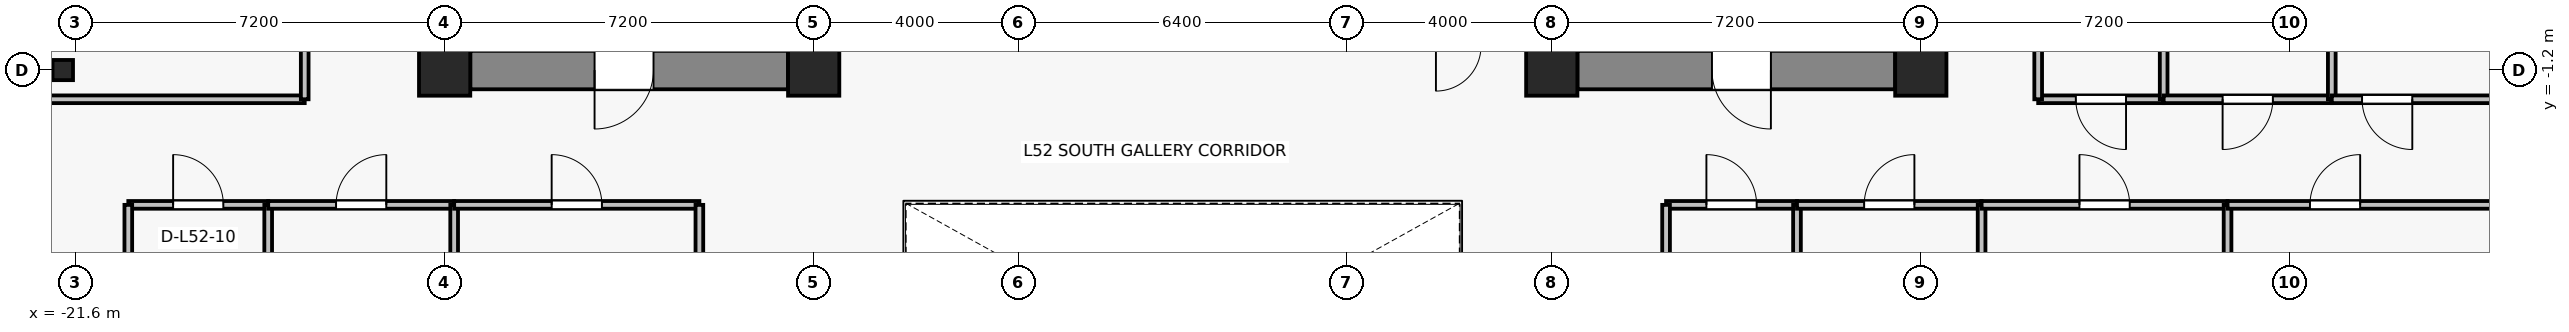
"""IFC4 building model, lengths in metres.
Left out: names, types, materials, properties, quantities, classifications, styles, units other than length and angle.
Written with IfcOpenShell. Run it as: python <this file> out.ifc"""

import sys

from ifc_helpers import new_model, si_unit, direction, frame, frame_2d, origin, origin_2d, place, context, subcontext, project, spatial, rectangle, i_section, extrude, source, transform, mapped, element, fill, save


model = new_model("IFC4")
c1 = context("Model", 3, precision=1e-05, world=origin(), true_north=direction((0.0, 1.0)))
c2 = subcontext(c1, "Body", "Model", "MODEL_VIEW")
j1 = project(units=[si_unit("LENGTHUNIT", "METRE"), si_unit("PLANEANGLEUNIT", "RADIAN")], contexts=[c1])
p1 = place(None, origin())
s1 = spatial("IfcSite", under=j1, at=p1, CompositionType="ELEMENT")
p2 = place(p1, origin())
s2 = spatial("IfcBuilding", under=s1, at=p2, CompositionType="ELEMENT")
p3 = place(p2, frame((0.0, 0.0, 185.8)))
s3 = spatial("IfcBuildingStorey", under=s2, at=p3, CompositionType="ELEMENT", Elevation=185.8)
for number, where, z_axis, x_axis in (
    (1, (-14.4, -1.2, 0.0), (0.0, 0.0, 1.0), (1.0, 0.0, 0.0)),
    (2, (-7.2, -1.2, 0.0), (0.0, 0.0, 1.0), (1.0, 0.0, 0.0)),
    (3, (7.2, -1.2, 0.0), (0.0, 0.0, 1.0), (1.0, 0.0, 0.0)),
    (4, (14.4, -1.2, 0.0), (0.0, 0.0, 1.0), (1.0, 0.0, 0.0)),
):
    element("IfcColumn", number, at=place(p3, frame(where, z_axis=z_axis, x_axis=x_axis)), inside=s3, PredefinedType="COLUMN", context=c2, shape_type="SweptSolid", body=[
        extrude(rectangle(XDim=1.0, YDim=1.0, at=origin_2d()), origin(), (0.0, 0.0, 1.0), 3.3),
    ])
p4 = place(p3, frame((-21.85, -1.2, 0.0), z_axis=(0.0, 0.0, 1.0), x_axis=(1.0, 0.0, 0.0)))
e5 = element("IfcColumn", 5, at=p4, inside=s3, PredefinedType="COLUMN", context=c2, shape_type="SweptSolid", body=[
    extrude(i_section(OverallWidth=0.399, OverallDepth=0.394, WebThickness=0.023, FlangeThickness=0.037, FilletRadius=0.015, at=origin_2d()), origin(), (0.0, 0.0, 1.0), 3.3),
])
p5 = place(p3, frame((-7.7, -1.2, 0.0), z_axis=(0.0, 0.0, 1.0), x_axis=(-1.0, 0.0, 0.0)))
e6 = element("IfcWall", 6, at=p5, inside=s3, PredefinedType="SHEAR", context=c2, shape_type="SweptSolid", body=[
    extrude(rectangle(XDim=6.2, YDim=0.75, at=frame_2d((3.1, 0.0))), origin(), (0.0, 0.0, 1.0), 3.075),
])
p6 = place(p5, frame((2.625, 0.0, 0.0)))
e7 = element("IfcOpeningElement", 7, at=p6, cuts=e6, PredefinedType="OPENING", context=c2, shape_type="SweptSolid", body=[
    extrude(rectangle(XDim=1.15, YDim=2.15, at=frame_2d((0.575, 1.075))), frame((0.0, 0.385, 0.0), z_axis=(0.0, -1.0, 0.0), x_axis=(1.0, 0.0, 0.0)), (0.0, 0.0, 1.0), 0.77),
])
p7 = place(p3, frame((13.9, -1.2, 0.0), z_axis=(0.0, 0.0, 1.0), x_axis=(-1.0, 0.0, 0.0)))
e8 = element("IfcWall", 8, at=p7, inside=s3, PredefinedType="SHEAR", context=c2, shape_type="SweptSolid", body=[
    extrude(rectangle(XDim=6.2, YDim=0.75, at=frame_2d((3.1, 0.0))), origin(), (0.0, 0.0, 1.0), 3.075),
])
p8 = place(p7, frame((2.425, 0.0, 0.0)))
e9 = element("IfcOpeningElement", 9, at=p8, cuts=e8, PredefinedType="OPENING", context=c2, shape_type="SweptSolid", body=[
    extrude(rectangle(XDim=1.15, YDim=2.15, at=frame_2d((0.575, 1.075))), frame((0.0, 0.385, 0.0), z_axis=(0.0, -1.0, 0.0), x_axis=(1.0, 0.0, 0.0)), (0.0, 0.0, 1.0), 0.77),
])
p9 = place(p3, frame((-20.572, -3.83, 0.0), z_axis=(0.0, 0.0, 1.0), x_axis=(1.0, 0.0, 0.0)))
e10 = element("IfcWall", 10, at=p9, inside=s3, PredefinedType="PARTITIONING", context=c2, shape_type="SweptSolid", body=[
    extrude(rectangle(XDim=2.729, YDim=0.15, at=frame_2d((1.365, 0.0))), origin(), (0.0, 0.0, 1.0), 3.075),
])
p10 = place(p9, frame((0.875, 0.0, 0.0)))
e11 = element("IfcOpeningElement", 11, at=p10, cuts=e10, PredefinedType="OPENING", context=c2, shape_type="SweptSolid", body=[
    extrude(rectangle(XDim=0.98, YDim=2.15, at=frame_2d((0.49, 1.075))), frame((0.0, 0.085, 0.0), z_axis=(0.0, -1.0, 0.0), x_axis=(1.0, 0.0, 0.0)), (0.0, 0.0, 1.0), 0.17),
])
for number, where, z_axis, x_axis in (
    (12, (-20.572, -7.12, 0.0), (0.0, 0.0, 1.0), (0.0, 1.0, 0.0)),
    (13, (-17.843, -3.83, 0.0), (0.0, 0.0, 1.0), (0.0, -1.0, 0.0)),
):
    element("IfcWall", number, at=place(p3, frame(where, z_axis=z_axis, x_axis=x_axis)), inside=s3, PredefinedType="PARTITIONING", context=c2, shape_type="SweptSolid", body=[
        extrude(rectangle(XDim=3.29, YDim=0.15, at=frame_2d((1.645, 0.0))), origin(), (0.0, 0.0, 1.0), 2.665),
    ])
p11 = place(p3, frame((-17.843, -3.83, 0.0), z_axis=(0.0, 0.0, 1.0), x_axis=(1.0, 0.0, 0.0)))
e14 = element("IfcWall", 14, at=p11, inside=s3, PredefinedType="PARTITIONING", context=c2, shape_type="SweptSolid", body=[
    extrude(rectangle(XDim=3.628, YDim=0.15, at=frame_2d((1.814, 0.0))), origin(), (0.0, 0.0, 1.0), 2.565),
])
p12 = place(p11, frame((1.324, 0.0, 0.0)))
e15 = element("IfcOpeningElement", 15, at=p12, cuts=e14, PredefinedType="OPENING", context=c2, shape_type="SweptSolid", body=[
    extrude(rectangle(XDim=0.98, YDim=2.15, at=frame_2d((0.49, 1.075))), frame((0.0, 0.085, 0.0), z_axis=(0.0, -1.0, 0.0), x_axis=(1.0, 0.0, 0.0)), (0.0, 0.0, 1.0), 0.17),
])
p13 = place(p3, frame((-14.214, -3.83, 0.0), z_axis=(0.0, 0.0, 1.0), x_axis=(0.0, -1.0, 0.0)))
e16 = element("IfcWall", 16, at=p13, inside=s3, PredefinedType="PARTITIONING", context=c2, shape_type="SweptSolid", body=[
    extrude(rectangle(XDim=3.29, YDim=0.15, at=frame_2d((1.645, 0.0))), origin(), (0.0, 0.0, 1.0), 2.565),
])
p14 = place(p3, frame((-14.214, -3.83, 0.0), z_axis=(0.0, 0.0, 1.0), x_axis=(1.0, 0.0, 0.0)))
e17 = element("IfcWall", 17, at=p14, inside=s3, PredefinedType="PARTITIONING", context=c2, shape_type="SweptSolid", body=[
    extrude(rectangle(XDim=4.784, YDim=0.15, at=frame_2d((2.392, 0.0))), origin(), (0.0, 0.0, 1.0), 2.565),
])
p15 = place(p14, frame((1.902, 0.0, 0.0)))
e18 = element("IfcOpeningElement", 18, at=p15, cuts=e17, PredefinedType="OPENING", context=c2, shape_type="SweptSolid", body=[
    extrude(rectangle(XDim=0.98, YDim=2.15, at=frame_2d((0.49, 1.075))), frame((0.0, 0.085, 0.0), z_axis=(0.0, -1.0, 0.0), x_axis=(1.0, 0.0, 0.0)), (0.0, 0.0, 1.0), 0.17),
])
p16 = place(p3, frame((-9.43, -3.83, 0.0), z_axis=(0.0, 0.0, 1.0), x_axis=(0.0, -1.0, 0.0)))
e19 = element("IfcWall", 19, at=p16, inside=s3, PredefinedType="PARTITIONING", context=c2, shape_type="SweptSolid", body=[
    extrude(rectangle(XDim=3.29, YDim=0.15, at=frame_2d((1.645, 0.0))), origin(), (0.0, 0.0, 1.0), 2.665),
])
p17 = place(p3, frame((9.43, -3.83, 0.0), z_axis=(0.0, 0.0, 1.0), x_axis=(1.0, 0.0, 0.0)))
e20 = element("IfcWall", 20, at=p17, inside=s3, PredefinedType="PARTITIONING", context=c2, shape_type="SweptSolid", body=[
    extrude(rectangle(XDim=2.554, YDim=0.15, at=frame_2d((1.277, 0.0))), origin(), (0.0, 0.0, 1.0), 3.075),
])
p18 = place(p17, frame((0.787, 0.0, 0.0)))
e21 = element("IfcOpeningElement", 21, at=p18, cuts=e20, PredefinedType="OPENING", context=c2, shape_type="SweptSolid", body=[
    extrude(rectangle(XDim=0.98, YDim=2.15, at=frame_2d((0.49, 1.075))), frame((0.0, 0.085, 0.0), z_axis=(0.0, -1.0, 0.0), x_axis=(1.0, 0.0, 0.0)), (0.0, 0.0, 1.0), 0.17),
])
for number, where, z_axis, x_axis in (
    (22, (9.43, -7.12, 0.0), (0.0, 0.0, 1.0), (0.0, 1.0, 0.0)),
    (23, (11.984, -3.83, 0.0), (0.0, 0.0, 1.0), (0.0, -1.0, 0.0)),
):
    element("IfcWall", number, at=place(p3, frame(where, z_axis=z_axis, x_axis=x_axis)), inside=s3, PredefinedType="PARTITIONING", context=c2, shape_type="SweptSolid", body=[
        extrude(rectangle(XDim=3.29, YDim=0.15, at=frame_2d((1.645, 0.0))), origin(), (0.0, 0.0, 1.0), 2.665),
    ])
p19 = place(p3, frame((11.984, -3.83, 0.0), z_axis=(0.0, 0.0, 1.0), x_axis=(1.0, 0.0, 0.0)))
e24 = element("IfcWall", 24, at=p19, inside=s3, PredefinedType="PARTITIONING", context=c2, shape_type="SweptSolid", body=[
    extrude(rectangle(XDim=3.602, YDim=0.15, at=frame_2d((1.801, 0.0))), origin(), (0.0, 0.0, 1.0), 2.565),
])
p20 = place(p19, frame((1.311, 0.0, 0.0)))
e25 = element("IfcOpeningElement", 25, at=p20, cuts=e24, PredefinedType="OPENING", context=c2, shape_type="SweptSolid", body=[
    extrude(rectangle(XDim=0.98, YDim=2.15, at=frame_2d((0.49, 1.075))), frame((0.0, 0.085, 0.0), z_axis=(0.0, -1.0, 0.0), x_axis=(1.0, 0.0, 0.0)), (0.0, 0.0, 1.0), 0.17),
])
p21 = place(p3, frame((15.586, -3.83, 0.0), z_axis=(0.0, 0.0, 1.0), x_axis=(0.0, -1.0, 0.0)))
e26 = element("IfcWall", 26, at=p21, inside=s3, PredefinedType="PARTITIONING", context=c2, shape_type="SweptSolid", body=[
    extrude(rectangle(XDim=3.29, YDim=0.15, at=frame_2d((1.645, 0.0))), origin(), (0.0, 0.0, 1.0), 3.075),
])
p22 = place(p3, frame((15.586, -3.83, 0.0), z_axis=(0.0, 0.0, 1.0), x_axis=(1.0, 0.0, 0.0)))
e27 = element("IfcWall", 27, at=p22, inside=s3, PredefinedType="PARTITIONING", context=c2, shape_type="SweptSolid", body=[
    extrude(rectangle(XDim=4.799, YDim=0.15, at=frame_2d((2.399, 0.0))), origin(), (0.0, 0.0, 1.0), 3.075),
])
p23 = place(p22, frame((1.909, 0.0, 0.0)))
e28 = element("IfcOpeningElement", 28, at=p23, cuts=e27, PredefinedType="OPENING", context=c2, shape_type="SweptSolid", body=[
    extrude(rectangle(XDim=0.98, YDim=2.15, at=frame_2d((0.49, 1.075))), frame((0.0, 0.085, 0.0), z_axis=(0.0, -1.0, 0.0), x_axis=(1.0, 0.0, 0.0)), (0.0, 0.0, 1.0), 0.17),
])
p24 = place(p3, frame((20.385, -3.83, 0.0), z_axis=(0.0, 0.0, 1.0), x_axis=(0.0, -1.0, 0.0)))
e29 = element("IfcWall", 29, at=p24, inside=s3, PredefinedType="PARTITIONING", context=c2, shape_type="SweptSolid", body=[
    extrude(rectangle(XDim=3.29, YDim=0.15, at=frame_2d((1.645, 0.0))), origin(), (0.0, 0.0, 1.0), 3.075),
])
p25 = place(p3, frame((20.385, -3.83, 0.0), z_axis=(0.0, 0.0, 1.0), x_axis=(1.0, 0.0, 0.0)))
e30 = element("IfcWall", 30, at=p25, inside=s3, PredefinedType="PARTITIONING", context=c2, shape_type="SweptSolid", body=[
    extrude(rectangle(XDim=6.146, YDim=0.15, at=frame_2d((3.073, 0.0))), origin(), (0.0, 0.0, 1.0), 2.565),
])
p26 = place(p25, frame((1.607, 0.0, 0.0)))
e31 = element("IfcOpeningElement", 31, at=p26, cuts=e30, PredefinedType="OPENING", context=c2, shape_type="SweptSolid", body=[
    extrude(rectangle(XDim=0.98, YDim=2.15, at=frame_2d((0.49, 1.075))), frame((0.0, 0.085, 0.0), z_axis=(0.0, -1.0, 0.0), x_axis=(1.0, 0.0, 0.0)), (0.0, 0.0, 1.0), 0.17),
])
p27 = place(p3, frame((-17.13, -1.77, 0.0), z_axis=(0.0, 0.0, 1.0), x_axis=(-1.0, 0.0, 0.0)))
e32 = element("IfcWall", 32, at=p27, inside=s3, PredefinedType="PARTITIONING", context=c2, shape_type="SweptSolid", body=[
    extrude(rectangle(XDim=5.4, YDim=0.15, at=frame_2d((2.7, 0.0))), origin(), (0.0, 0.0, 1.0), 2.565),
])
p28 = place(p3, frame((-17.13, 13.88, 0.0), z_axis=(0.0, 0.0, 1.0), x_axis=(0.0, -1.0, 0.0)))
e33 = element("IfcWall", 33, at=p28, inside=s3, PredefinedType="PARTITIONING", context=c2, shape_type="SweptSolid", body=[
    extrude(rectangle(XDim=15.65, YDim=0.15, at=frame_2d((7.825, 0.0))), origin(), (0.0, 0.0, 1.0), 2.565),
])
p29 = place(p28, frame((7.335, 0.0, 0.0)))
e34 = element("IfcOpeningElement", 34, at=p29, cuts=e33, PredefinedType="OPENING", context=c2, shape_type="SweptSolid", body=[
    extrude(rectangle(XDim=0.98, YDim=2.15, at=frame_2d((0.49, 1.075))), frame((0.0, 0.085, 0.0), z_axis=(0.0, -1.0, 0.0), x_axis=(1.0, 0.0, 0.0)), (0.0, 0.0, 1.0), 0.17),
])
p30 = place(p3, frame((19.138, -1.77, 0.0), z_axis=(0.0, 0.0, 1.0), x_axis=(-1.0, 0.0, 0.0)))
e35 = element("IfcWall", 35, at=p30, inside=s3, PredefinedType="PARTITIONING", context=c2, shape_type="SweptSolid", body=[
    extrude(rectangle(XDim=2.448, YDim=0.15, at=frame_2d((1.224, 0.0))), origin(), (0.0, 0.0, 1.0), 3.075),
])
p31 = place(p30, frame((0.734, 0.0, 0.0)))
e36 = element("IfcOpeningElement", 36, at=p31, cuts=e35, PredefinedType="OPENING", context=c2, shape_type="SweptSolid", body=[
    extrude(rectangle(XDim=0.98, YDim=2.15, at=frame_2d((0.49, 1.075))), frame((0.0, 0.085, 0.0), z_axis=(0.0, -1.0, 0.0), x_axis=(1.0, 0.0, 0.0)), (0.0, 0.0, 1.0), 0.17),
])
for number, where, z_axis, x_axis in (
    (37, (16.69, -1.77, 0.0), (0.0, 0.0, 1.0), (0.0, 1.0, 0.0)),
    (38, (19.138, 13.88, 0.0), (0.0, 0.0, 1.0), (0.0, -1.0, 0.0)),
):
    element("IfcWall", number, at=place(p3, frame(where, z_axis=z_axis, x_axis=x_axis)), inside=s3, PredefinedType="PARTITIONING", context=c2, shape_type="SweptSolid", body=[
        extrude(rectangle(XDim=15.65, YDim=0.15, at=frame_2d((7.825, 0.0))), origin(), (0.0, 0.0, 1.0), 2.565),
    ])
p32 = place(p3, frame((22.418, -1.77, 0.0), z_axis=(0.0, 0.0, 1.0), x_axis=(-1.0, 0.0, 0.0)))
e39 = element("IfcWall", 39, at=p32, inside=s3, PredefinedType="PARTITIONING", context=c2, shape_type="SweptSolid", body=[
    extrude(rectangle(XDim=3.28, YDim=0.15, at=frame_2d((1.64, 0.0))), origin(), (0.0, 0.0, 1.0), 3.075),
])
p33 = place(p32, frame((1.15, 0.0, 0.0)))
e40 = element("IfcOpeningElement", 40, at=p33, cuts=e39, PredefinedType="OPENING", context=c2, shape_type="SweptSolid", body=[
    extrude(rectangle(XDim=0.98, YDim=2.15, at=frame_2d((0.49, 1.075))), frame((0.0, 0.085, 0.0), z_axis=(0.0, -1.0, 0.0), x_axis=(1.0, 0.0, 0.0)), (0.0, 0.0, 1.0), 0.17),
])
p34 = place(p3, frame((22.418, 13.88, 0.0), z_axis=(0.0, 0.0, 1.0), x_axis=(0.0, -1.0, 0.0)))
e41 = element("IfcWall", 41, at=p34, inside=s3, PredefinedType="PARTITIONING", context=c2, shape_type="SweptSolid", body=[
    extrude(rectangle(XDim=15.65, YDim=0.15, at=frame_2d((7.825, 0.0))), origin(), (0.0, 0.0, 1.0), 2.565),
])
p35 = place(p3, frame((26.53, -1.77, 0.0), z_axis=(0.0, 0.0, 1.0), x_axis=(-1.0, 0.0, 0.0)))
e42 = element("IfcWall", 42, at=p35, inside=s3, PredefinedType="PARTITIONING", context=c2, shape_type="SweptSolid", body=[
    extrude(rectangle(XDim=4.112, YDim=0.15, at=frame_2d((2.056, 0.0))), origin(), (0.0, 0.0, 1.0), 2.565),
])
p36 = place(p35, frame((2.541, 0.0, 0.0)))
e43 = element("IfcOpeningElement", 43, at=p36, cuts=e42, PredefinedType="OPENING", context=c2, shape_type="SweptSolid", body=[
    extrude(rectangle(XDim=0.98, YDim=2.15, at=frame_2d((0.49, 1.075))), frame((0.0, 0.085, 0.0), z_axis=(0.0, -1.0, 0.0), x_axis=(1.0, 0.0, 0.0)), (0.0, 0.0, 1.0), 0.17),
])
m1 = source(origin(), c2, "Body", "SweptSolid", [
    extrude(rectangle(XDim=1.15, YDim=2.15, at=frame_2d((0.575, 1.075))), frame((0.0, 0.025, 0.0), z_axis=(0.0, -1.0, 0.0), x_axis=(1.0, 0.0, 0.0)), (0.0, 0.0, 1.0), 0.05),
])
p37 = place(p6, origin())
e44 = element("IfcDoor", 44, at=p37, inside=s3, OperationType="SINGLE_SWING_RIGHT", PredefinedType="DOOR", context=c2, shape_type="MappedRepresentation", body=[
    mapped(m1, transform((0.0, 0.0, 0.0), x_axis=(1.0, 0.0, 0.0), y_axis=(0.0, 1.0, 0.0), z_axis=(0.0, 0.0, 1.0), scale=1.0)),
])
fill(e7, e44)
p38 = place(p8, origin())
e45 = element("IfcDoor", 45, at=p38, inside=s3, OperationType="SINGLE_SWING_LEFT", PredefinedType="DOOR", context=c2, shape_type="MappedRepresentation", body=[
    mapped(m1, transform((0.0, 0.0, 0.0), x_axis=(1.0, 0.0, 0.0), y_axis=(0.0, 1.0, 0.0), z_axis=(0.0, 0.0, 1.0), scale=1.0)),
])
fill(e9, e45)
m2 = source(origin(), c2, "Body", "SweptSolid", [
    extrude(rectangle(XDim=0.98, YDim=2.15, at=frame_2d((0.49, 1.075))), frame((0.0, 0.025, 0.0), z_axis=(0.0, -1.0, 0.0), x_axis=(1.0, 0.0, 0.0)), (0.0, 0.0, 1.0), 0.05),
])
p39 = place(p10, origin())
e46 = element("IfcDoor", 46, at=p39, inside=s3, OperationType="SINGLE_SWING_LEFT", PredefinedType="DOOR", context=c2, shape_type="MappedRepresentation", body=[
    mapped(m2, transform((0.0, 0.0, 0.0), x_axis=(1.0, 0.0, 0.0), y_axis=(0.0, 1.0, 0.0), z_axis=(0.0, 0.0, 1.0), scale=1.0)),
])
fill(e11, e46)
p40 = place(p12, origin())
e47 = element("IfcDoor", 47, at=p40, inside=s3, OperationType="SINGLE_SWING_RIGHT", PredefinedType="DOOR", context=c2, shape_type="MappedRepresentation", body=[
    mapped(m2, transform((0.0, 0.0, 0.0), x_axis=(1.0, 0.0, 0.0), y_axis=(0.0, 1.0, 0.0), z_axis=(0.0, 0.0, 1.0), scale=1.0)),
])
fill(e15, e47)
p41 = place(p15, origin())
e48 = element("IfcDoor", 48, at=p41, inside=s3, OperationType="SINGLE_SWING_LEFT", PredefinedType="DOOR", context=c2, shape_type="MappedRepresentation", body=[
    mapped(m2, transform((0.0, 0.0, 0.0), x_axis=(1.0, 0.0, 0.0), y_axis=(0.0, 1.0, 0.0), z_axis=(0.0, 0.0, 1.0), scale=1.0)),
])
fill(e18, e48)
p42 = place(p18, origin())
e49 = element("IfcDoor", 49, at=p42, inside=s3, OperationType="SINGLE_SWING_LEFT", PredefinedType="DOOR", context=c2, shape_type="MappedRepresentation", body=[
    mapped(m2, transform((0.0, 0.0, 0.0), x_axis=(1.0, 0.0, 0.0), y_axis=(0.0, 1.0, 0.0), z_axis=(0.0, 0.0, 1.0), scale=1.0)),
])
fill(e21, e49)
p43 = place(p20, origin())
e50 = element("IfcDoor", 50, at=p43, inside=s3, OperationType="SINGLE_SWING_RIGHT", PredefinedType="DOOR", context=c2, shape_type="MappedRepresentation", body=[
    mapped(m2, transform((0.0, 0.0, 0.0), x_axis=(1.0, 0.0, 0.0), y_axis=(0.0, 1.0, 0.0), z_axis=(0.0, 0.0, 1.0), scale=1.0)),
])
fill(e25, e50)
p44 = place(p23, origin())
e51 = element("IfcDoor", 51, at=p44, inside=s3, OperationType="SINGLE_SWING_LEFT", PredefinedType="DOOR", context=c2, shape_type="MappedRepresentation", body=[
    mapped(m2, transform((0.0, 0.0, 0.0), x_axis=(1.0, 0.0, 0.0), y_axis=(0.0, 1.0, 0.0), z_axis=(0.0, 0.0, 1.0), scale=1.0)),
])
fill(e28, e51)
p45 = place(p26, origin())
e52 = element("IfcDoor", 52, at=p45, inside=s3, OperationType="SINGLE_SWING_RIGHT", PredefinedType="DOOR", context=c2, shape_type="MappedRepresentation", body=[
    mapped(m2, transform((0.0, 0.0, 0.0), x_axis=(1.0, 0.0, 0.0), y_axis=(0.0, 1.0, 0.0), z_axis=(0.0, 0.0, 1.0), scale=1.0)),
])
fill(e31, e52)
p46 = place(p31, origin())
e53 = element("IfcDoor", 53, at=p46, inside=s3, OperationType="SINGLE_SWING_LEFT", PredefinedType="DOOR", context=c2, shape_type="MappedRepresentation", body=[
    mapped(m2, transform((0.0, 0.0, 0.0), x_axis=(1.0, 0.0, 0.0), y_axis=(0.0, 1.0, 0.0), z_axis=(0.0, 0.0, 1.0), scale=1.0)),
])
fill(e36, e53)
p47 = place(p33, origin())
e54 = element("IfcDoor", 54, at=p47, inside=s3, OperationType="SINGLE_SWING_RIGHT", PredefinedType="DOOR", context=c2, shape_type="MappedRepresentation", body=[
    mapped(m2, transform((0.0, 0.0, 0.0), x_axis=(1.0, 0.0, 0.0), y_axis=(0.0, 1.0, 0.0), z_axis=(0.0, 0.0, 1.0), scale=1.0)),
])
fill(e40, e54)
p48 = place(p36, origin())
e55 = element("IfcDoor", 55, at=p48, inside=s3, OperationType="SINGLE_SWING_LEFT", PredefinedType="DOOR", context=c2, shape_type="MappedRepresentation", body=[
    mapped(m2, transform((0.0, 0.0, 0.0), x_axis=(1.0, 0.0, 0.0), y_axis=(0.0, 1.0, 0.0), z_axis=(0.0, 0.0, 1.0), scale=1.0)),
])
fill(e43, e55)
save(model, sys.argv[1])
